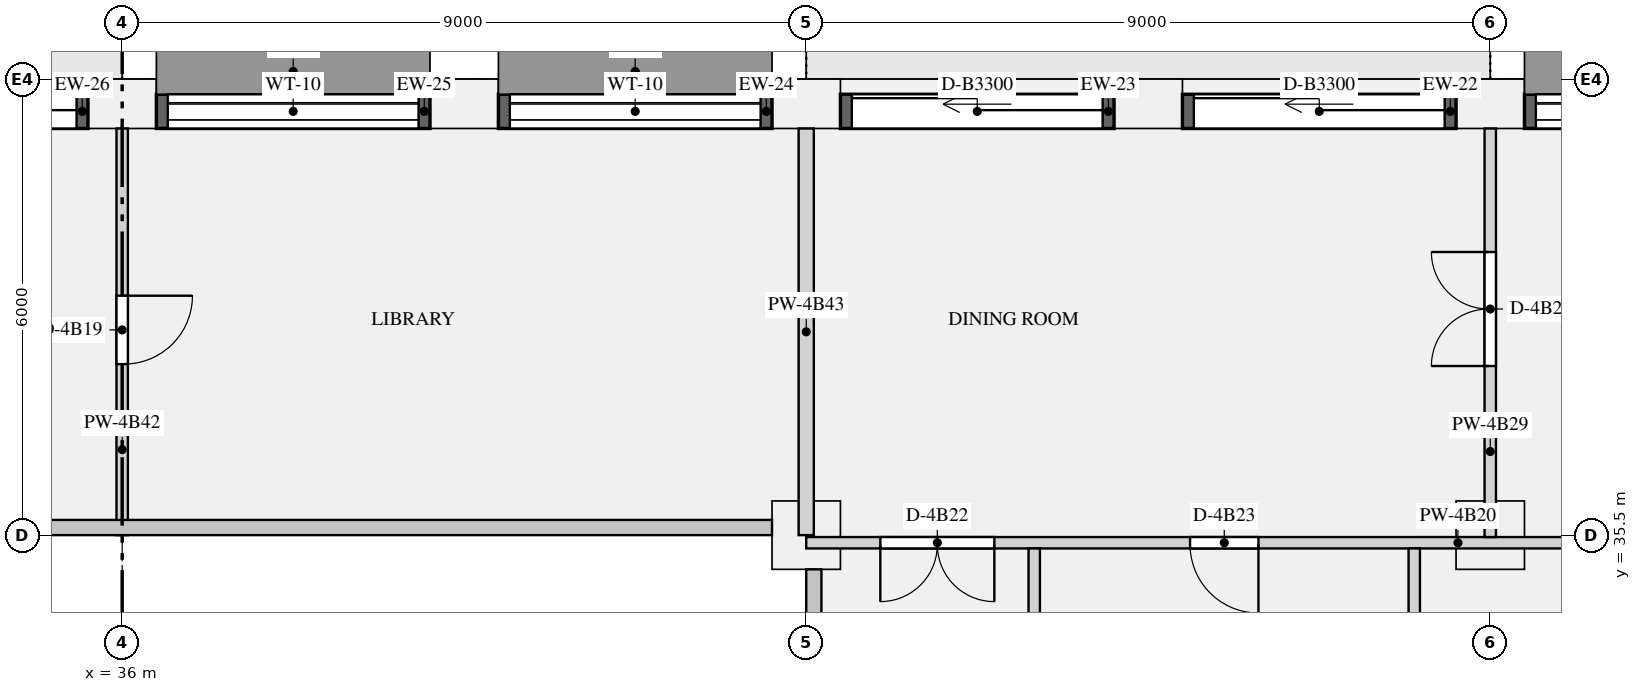
"""IFC4 building model, lengths in metres.
Left out: names, types, materials, properties, quantities, classifications, styles, units other than length and angle.
Written with IfcOpenShell. Run it as: python <this file> out.ifc"""

import sys

from ifc_helpers import new_model, si_unit, direction, frame, frame_2d, origin, origin_2d, place, context, subcontext, project, spatial, rectangle, extrude, element, fill, save


model = new_model("IFC4")
c1 = context("Model", 3, precision=1e-05, world=origin(), true_north=direction((0.0, 1.0)))
c2 = subcontext(c1, "Body", "Model", "MODEL_VIEW")
j1 = project(units=[si_unit("LENGTHUNIT", "METRE"), si_unit("PLANEANGLEUNIT", "RADIAN")], contexts=[c1])
p1 = place(None, origin())
s1 = spatial("IfcSite", under=j1, at=p1, CompositionType="ELEMENT")
p2 = place(p1, origin())
s2 = spatial("IfcBuilding", under=s1, at=p2, CompositionType="ELEMENT")
p3 = place(p2, frame((0.0, 0.0, 207.45)))
s3 = spatial("IfcBuildingStorey", under=s2, at=p3, CompositionType="ELEMENT", Elevation=207.45)
for number, where, z_axis, x_axis in (
    (1, (54.0, 41.175, 0.0), (0.0, 0.0, 1.0), (-1.0, 0.0, 0.0)),
    (2, (49.5, 41.175, 0.0), (0.0, 0.0, 1.0), (-1.0, 0.0, 0.0)),
    (3, (45.0, 41.175, 0.0), (0.0, 0.0, 1.0), (-1.0, 0.0, 0.0)),
    (4, (40.5, 41.175, 0.0), (0.0, 0.0, 1.0), (-1.0, 0.0, 0.0)),
    (5, (36.0, 41.175, 0.0), (0.0, 0.0, 1.0), (-1.0, 0.0, 0.0)),
):
    element("IfcColumn", number, at=place(p3, frame(where, z_axis=z_axis, x_axis=x_axis)), inside=s3, PredefinedType="USERDEFINED", context=c2, shape_type="SweptSolid", body=[
        extrude(rectangle(XDim=0.9, YDim=0.65, at=origin_2d()), origin(), (0.0, 0.0, 1.0), 3.15),
    ])
for number, where, z_axis, x_axis in (
    (6, (45.0, 35.5, 0.0), (0.0, 0.0, 1.0), (1.0, 0.0, 0.0)),
    (7, (54.0, 35.5, 0.0), (0.0, 0.0, 1.0), (1.0, 0.0, 0.0)),
):
    element("IfcColumn", number, at=place(p3, frame(where, z_axis=z_axis, x_axis=x_axis)), inside=s3, PredefinedType="COLUMN", context=c2, shape_type="SweptSolid", body=[
        extrude(rectangle(XDim=0.9, YDim=0.9, at=origin_2d()), origin(), (0.0, 0.0, 1.0), 3.15),
    ])
p4 = place(p3, frame((58.05, 41.075, 0.9), z_axis=(0.0, 0.0, 1.0), x_axis=(-1.0, 0.0, 0.0)))
e8 = element("IfcWall", 8, at=p4, inside=s3, PredefinedType="SOLIDWALL", context=c2, shape_type="SweptSolid", body=[
    extrude(rectangle(XDim=3.6, YDim=0.45, at=frame_2d((1.8, 0.0))), origin(), (0.0, 0.0, 1.0), 1.93),
])
p5 = place(p4, frame((0.15, 0.0, 0.15)))
e9 = element("IfcOpeningElement", 9, at=p5, cuts=e8, PredefinedType="OPENING", context=c2, shape_type="SweptSolid", body=[
    extrude(rectangle(XDim=3.3, YDim=1.5, at=frame_2d((1.65, 0.75))), frame((0.0, 0.235, 0.0), z_axis=(0.0, -1.0, 0.0), x_axis=(1.0, 0.0, 0.0)), (0.0, 0.0, 1.0), 0.47),
])
p6 = place(p3, frame((53.55, 41.075, 0.0), z_axis=(0.0, 0.0, 1.0), x_axis=(-1.0, 0.0, 0.0)))
e10 = element("IfcWall", 10, at=p6, inside=s3, PredefinedType="SOLIDWALL", context=c2, shape_type="SweptSolid", body=[
    extrude(rectangle(XDim=3.6, YDim=0.45, at=frame_2d((1.8, 0.0))), origin(), (0.0, 0.0, 1.0), 2.83),
])
p7 = place(p6, frame((0.15, 0.0, 0.0)))
e11 = element("IfcOpeningElement", 11, at=p7, cuts=e10, PredefinedType="OPENING", context=c2, shape_type="SweptSolid", body=[
    extrude(rectangle(XDim=3.3, YDim=2.3, at=frame_2d((1.65, 1.15))), frame((0.0, 0.235, 0.0), z_axis=(0.0, -1.0, 0.0), x_axis=(1.0, 0.0, 0.0)), (0.0, 0.0, 1.0), 0.47),
])
p8 = place(p3, frame((49.05, 41.075, 0.0), z_axis=(0.0, 0.0, 1.0), x_axis=(-1.0, 0.0, 0.0)))
e12 = element("IfcWall", 12, at=p8, inside=s3, PredefinedType="SOLIDWALL", context=c2, shape_type="SweptSolid", body=[
    extrude(rectangle(XDim=3.6, YDim=0.45, at=frame_2d((1.8, 0.0))), origin(), (0.0, 0.0, 1.0), 2.83),
])
p9 = place(p8, frame((0.15, 0.0, 0.0)))
e13 = element("IfcOpeningElement", 13, at=p9, cuts=e12, PredefinedType="OPENING", context=c2, shape_type="SweptSolid", body=[
    extrude(rectangle(XDim=3.3, YDim=2.3, at=frame_2d((1.65, 1.15))), frame((0.0, 0.235, 0.0), z_axis=(0.0, -1.0, 0.0), x_axis=(1.0, 0.0, 0.0)), (0.0, 0.0, 1.0), 0.47),
])
p10 = place(p3, frame((44.55, 41.075, 0.9), z_axis=(0.0, 0.0, 1.0), x_axis=(-1.0, 0.0, 0.0)))
e14 = element("IfcWall", 14, at=p10, inside=s3, PredefinedType="SOLIDWALL", context=c2, shape_type="SweptSolid", body=[
    extrude(rectangle(XDim=3.6, YDim=0.45, at=frame_2d((1.8, 0.0))), origin(), (0.0, 0.0, 1.0), 1.93),
])
p11 = place(p10, frame((0.15, 0.0, 0.15)))
e15 = element("IfcOpeningElement", 15, at=p11, cuts=e14, PredefinedType="OPENING", context=c2, shape_type="SweptSolid", body=[
    extrude(rectangle(XDim=3.3, YDim=1.5, at=frame_2d((1.65, 0.75))), frame((0.0, 0.235, 0.0), z_axis=(0.0, -1.0, 0.0), x_axis=(1.0, 0.0, 0.0)), (0.0, 0.0, 1.0), 0.47),
])
p12 = place(p3, frame((40.05, 41.075, 0.9), z_axis=(0.0, 0.0, 1.0), x_axis=(-1.0, 0.0, 0.0)))
e16 = element("IfcWall", 16, at=p12, inside=s3, PredefinedType="SOLIDWALL", context=c2, shape_type="SweptSolid", body=[
    extrude(rectangle(XDim=3.6, YDim=0.45, at=frame_2d((1.8, 0.0))), origin(), (0.0, 0.0, 1.0), 1.93),
])
p13 = place(p12, frame((0.15, 0.0, 0.15)))
e17 = element("IfcOpeningElement", 17, at=p13, cuts=e16, PredefinedType="OPENING", context=c2, shape_type="SweptSolid", body=[
    extrude(rectangle(XDim=3.3, YDim=1.5, at=frame_2d((1.65, 0.75))), frame((0.0, 0.235, 0.0), z_axis=(0.0, -1.0, 0.0), x_axis=(1.0, 0.0, 0.0)), (0.0, 0.0, 1.0), 0.47),
])
p14 = place(p3, frame((35.55, 41.075, 0.0), z_axis=(0.0, 0.0, 1.0), x_axis=(-1.0, 0.0, 0.0)))
e18 = element("IfcWall", 18, at=p14, inside=s3, PredefinedType="SOLIDWALL", context=c2, shape_type="SweptSolid", body=[
    extrude(rectangle(XDim=3.6, YDim=0.45, at=frame_2d((1.8, 0.0))), origin(), (0.0, 0.0, 1.0), 2.83),
])
p15 = place(p14, frame((0.15, 0.0, 0.0)))
e19 = element("IfcOpeningElement", 19, at=p15, cuts=e18, PredefinedType="OPENING", context=c2, shape_type="SweptSolid", body=[
    extrude(rectangle(XDim=3.3, YDim=2.3, at=frame_2d((1.65, 1.15))), frame((0.0, 0.235, 0.0), z_axis=(0.0, -1.0, 0.0), x_axis=(1.0, 0.0, 0.0)), (0.0, 0.0, 1.0), 0.47),
])
p16 = place(p3, frame((45.0, 35.4, 0.0), z_axis=(0.0, 0.0, 1.0), x_axis=(1.0, 0.0, 0.0)))
e20 = element("IfcWall", 20, at=p16, inside=s3, PredefinedType="PARTITIONING", context=c2, shape_type="SweptSolid", body=[
    extrude(rectangle(XDim=11.2, YDim=0.15, at=frame_2d((5.6, 0.0))), origin(), (0.0, 0.0, 1.0), 2.83),
])
p17 = place(p16, frame((0.975, 0.0, 0.0)))
e21 = element("IfcOpeningElement", 21, at=p17, cuts=e20, PredefinedType="OPENING", context=c2, shape_type="SweptSolid", body=[
    extrude(rectangle(XDim=1.5, YDim=2.1, at=frame_2d((0.75, 1.05))), frame((0.0, 0.085, 0.0), z_axis=(0.0, -1.0, 0.0), x_axis=(1.0, 0.0, 0.0)), (0.0, 0.0, 1.0), 0.17),
])
p18 = place(p16, frame((5.05, 0.0, 0.0)))
e22 = element("IfcOpeningElement", 22, at=p18, cuts=e20, PredefinedType="OPENING", context=c2, shape_type="SweptSolid", body=[
    extrude(rectangle(XDim=0.9, YDim=2.1, at=frame_2d((0.45, 1.05))), frame((0.0, 0.085, 0.0), z_axis=(0.0, -1.0, 0.0), x_axis=(1.0, 0.0, 0.0)), (0.0, 0.0, 1.0), 0.17),
])
p19 = place(p3, frame((54.0, 35.475, 0.0), z_axis=(0.0, 0.0, 1.0), x_axis=(0.0, 1.0, 0.0)))
e23 = element("IfcWall", 23, at=p19, inside=s3, PredefinedType="PARTITIONING", context=c2, shape_type="SweptSolid", body=[
    extrude(rectangle(XDim=5.375, YDim=0.15, at=frame_2d((2.688, 0.0))), origin(), (0.0, 0.0, 1.0), 2.83),
])
p20 = place(p19, frame((2.25, 0.0, 0.0)))
e24 = element("IfcOpeningElement", 24, at=p20, cuts=e23, PredefinedType="OPENING", context=c2, shape_type="SweptSolid", body=[
    extrude(rectangle(XDim=1.5, YDim=2.1, at=frame_2d((0.75, 1.05))), frame((0.0, 0.085, 0.0), z_axis=(0.0, -1.0, 0.0), x_axis=(1.0, 0.0, 0.0)), (0.0, 0.0, 1.0), 0.17),
])
p21 = place(p3, frame((48.0, 27.1, 0.0), z_axis=(0.0, 0.0, 1.0), x_axis=(0.0, 1.0, 0.0)))
e25 = element("IfcWall", 25, at=p21, inside=s3, PredefinedType="PARTITIONING", context=c2, shape_type="SweptSolid", body=[
    extrude(rectangle(XDim=8.225, YDim=0.15, at=frame_2d((4.112, 0.0))), origin(), (0.0, 0.0, 1.0), 2.83),
])
p22 = place(p21, frame((3.65, 0.0, 0.0)))
e26 = element("IfcOpeningElement", 26, at=p22, cuts=e25, PredefinedType="OPENING", context=c2, shape_type="SweptSolid", body=[
    extrude(rectangle(XDim=0.9, YDim=2.1, at=frame_2d((0.45, 1.05))), frame((0.0, 0.085, 0.0), z_axis=(0.0, -1.0, 0.0), x_axis=(1.0, 0.0, 0.0)), (0.0, 0.0, 1.0), 0.17),
])
p23 = place(p3, frame((36.0, 35.5, 0.0), z_axis=(0.0, 0.0, 1.0), x_axis=(0.0, 1.0, 0.0)))
e27 = element("IfcWall", 27, at=p23, inside=s3, PredefinedType="PARTITIONING", context=c2, shape_type="SweptSolid", body=[
    extrude(rectangle(XDim=5.35, YDim=0.15, at=frame_2d((2.675, 0.0))), origin(), (0.0, 0.0, 1.0), 2.83),
])
p24 = place(p23, frame((2.25, 0.0, 0.0)))
e28 = element("IfcOpeningElement", 28, at=p24, cuts=e27, PredefinedType="OPENING", context=c2, shape_type="SweptSolid", body=[
    extrude(rectangle(XDim=0.9, YDim=2.1, at=frame_2d((0.45, 1.05))), frame((0.0, 0.085, 0.0), z_axis=(0.0, -1.0, 0.0), x_axis=(1.0, 0.0, 0.0)), (0.0, 0.0, 1.0), 0.17),
])
p25 = place(p3, frame((45.0, 35.5, 0.0), z_axis=(0.0, 0.0, 1.0), x_axis=(0.0, 1.0, 0.0)))
e29 = element("IfcWall", 29, at=p25, inside=s3, PredefinedType="PARTITIONING", context=c2, shape_type="SweptSolid", body=[
    extrude(rectangle(XDim=5.35, YDim=0.2, at=frame_2d((2.675, 0.0))), origin(), (0.0, 0.0, 1.0), 2.83),
])
p26 = place(p3, frame((53.0, 27.1, 0.0), z_axis=(0.0, 0.0, 1.0), x_axis=(0.0, 1.0, 0.0)))
e30 = element("IfcWall", 30, at=p26, inside=s3, PredefinedType="PARTITIONING", context=c2, shape_type="SweptSolid", body=[
    extrude(rectangle(XDim=8.225, YDim=0.15, at=frame_2d((4.112, 0.0))), origin(), (0.0, 0.0, 1.0), 2.83),
])
p27 = place(p26, frame((1.45, 0.0, 0.0)))
e31 = element("IfcOpeningElement", 31, at=p27, cuts=e30, PredefinedType="OPENING", context=c2, shape_type="SweptSolid", body=[
    extrude(rectangle(XDim=0.9, YDim=2.1, at=frame_2d((0.45, 1.05))), frame((0.0, 0.085, 0.0), z_axis=(0.0, -1.0, 0.0), x_axis=(1.0, 0.0, 0.0)), (0.0, 0.0, 1.0), 0.17),
])
p28 = place(p26, frame((5.625, 0.0, 0.0)))
e32 = element("IfcOpeningElement", 32, at=p28, cuts=e30, PredefinedType="OPENING", context=c2, shape_type="SweptSolid", body=[
    extrude(rectangle(XDim=0.9, YDim=2.1, at=frame_2d((0.45, 1.05))), frame((0.0, 0.085, 0.0), z_axis=(0.0, -1.0, 0.0), x_axis=(1.0, 0.0, 0.0)), (0.0, 0.0, 1.0), 0.17),
])
p29 = place(p5, origin())
e33 = element("IfcWindow", 33, at=p29, inside=s3, PartitioningType="SINGLE_PANEL", PredefinedType="WINDOW", context=c2, shape_type="SweptSolid", body=[
    extrude(rectangle(XDim=3.3, YDim=1.5, at=frame_2d((1.65, 0.75))), frame((0.0, -0.065, 0.0), z_axis=(0.0, -1.0, 0.0), x_axis=(1.0, 0.0, 0.0)), (0.0, 0.0, 1.0), 0.06),
])
fill(e9, e33)
p30 = place(p7, origin())
e34 = element("IfcDoor", 34, at=p30, inside=s3, OperationType="SLIDING_TO_LEFT", PredefinedType="DOOR", context=c2, shape_type="SweptSolid", body=[
    extrude(rectangle(XDim=3.3, YDim=2.3, at=frame_2d((1.65, 1.15))), frame((0.0, -0.07, 0.0), z_axis=(0.0, -1.0, 0.0), x_axis=(1.0, 0.0, 0.0)), (0.0, 0.0, 1.0), 0.05),
])
fill(e11, e34)
p31 = place(p9, origin())
e35 = element("IfcDoor", 35, at=p31, inside=s3, OperationType="SLIDING_TO_LEFT", PredefinedType="DOOR", context=c2, shape_type="SweptSolid", body=[
    extrude(rectangle(XDim=3.3, YDim=2.3, at=frame_2d((1.65, 1.15))), frame((0.0, -0.07, 0.0), z_axis=(0.0, -1.0, 0.0), x_axis=(1.0, 0.0, 0.0)), (0.0, 0.0, 1.0), 0.05),
])
fill(e13, e35)
p32 = place(p11, origin())
e36 = element("IfcWindow", 36, at=p32, inside=s3, PartitioningType="SINGLE_PANEL", PredefinedType="WINDOW", context=c2, shape_type="SweptSolid", body=[
    extrude(rectangle(XDim=3.3, YDim=1.5, at=frame_2d((1.65, 0.75))), frame((0.0, -0.065, 0.0), z_axis=(0.0, -1.0, 0.0), x_axis=(1.0, 0.0, 0.0)), (0.0, 0.0, 1.0), 0.06),
])
fill(e15, e36)
p33 = place(p13, origin())
e37 = element("IfcWindow", 37, at=p33, inside=s3, PartitioningType="SINGLE_PANEL", PredefinedType="WINDOW", context=c2, shape_type="SweptSolid", body=[
    extrude(rectangle(XDim=3.3, YDim=1.5, at=frame_2d((1.65, 0.75))), frame((0.0, -0.065, 0.0), z_axis=(0.0, -1.0, 0.0), x_axis=(1.0, 0.0, 0.0)), (0.0, 0.0, 1.0), 0.06),
])
fill(e17, e37)
p34 = place(p15, origin())
e38 = element("IfcDoor", 38, at=p34, inside=s3, OperationType="SLIDING_TO_LEFT", PredefinedType="DOOR", context=c2, shape_type="SweptSolid", body=[
    extrude(rectangle(XDim=3.3, YDim=2.3, at=frame_2d((1.65, 1.15))), frame((0.0, -0.07, 0.0), z_axis=(0.0, -1.0, 0.0), x_axis=(1.0, 0.0, 0.0)), (0.0, 0.0, 1.0), 0.05),
])
fill(e19, e38)
p35 = place(p24, frame((0.9, 0.0, 0.0), z_axis=(0.0, 0.0, 1.0), x_axis=(-1.0, 0.0, 0.0)))
e39 = element("IfcDoor", 39, at=p35, inside=s3, OperationType="SINGLE_SWING_LEFT", PredefinedType="DOOR", context=c2, shape_type="SweptSolid", body=[
    extrude(rectangle(XDim=0.9, YDim=2.1, at=frame_2d((0.45, 1.05))), frame((0.0, 0.025, 0.0), z_axis=(0.0, -1.0, 0.0), x_axis=(1.0, 0.0, 0.0)), (0.0, 0.0, 1.0), 0.05),
])
fill(e28, e39)
p36 = place(p17, frame((1.5, 0.0, 0.0), z_axis=(0.0, 0.0, 1.0), x_axis=(-1.0, 0.0, 0.0)))
e40 = element("IfcDoor", 40, at=p36, inside=s3, OperationType="DOUBLE_DOOR_SINGLE_SWING", PredefinedType="DOOR", context=c2, shape_type="SweptSolid", body=[
    extrude(rectangle(XDim=1.5, YDim=2.1, at=frame_2d((0.75, 1.05))), frame((0.0, 0.025, 0.0), z_axis=(0.0, -1.0, 0.0), x_axis=(1.0, 0.0, 0.0)), (0.0, 0.0, 1.0), 0.05),
])
fill(e21, e40)
p37 = place(p18, frame((0.9, 0.0, 0.0), z_axis=(0.0, 0.0, 1.0), x_axis=(-1.0, 0.0, 0.0)))
e41 = element("IfcDoor", 41, at=p37, inside=s3, OperationType="SINGLE_SWING_LEFT", PredefinedType="DOOR", context=c2, shape_type="SweptSolid", body=[
    extrude(rectangle(XDim=0.9, YDim=2.1, at=frame_2d((0.45, 1.05))), frame((0.0, 0.025, 0.0), z_axis=(0.0, -1.0, 0.0), x_axis=(1.0, 0.0, 0.0)), (0.0, 0.0, 1.0), 0.05),
])
fill(e22, e41)
p38 = place(p20, origin())
e42 = element("IfcDoor", 42, at=p38, inside=s3, OperationType="DOUBLE_DOOR_SINGLE_SWING", PredefinedType="DOOR", context=c2, shape_type="SweptSolid", body=[
    extrude(rectangle(XDim=1.5, YDim=2.1, at=frame_2d((0.75, 1.05))), frame((0.0, 0.025, 0.0), z_axis=(0.0, -1.0, 0.0), x_axis=(1.0, 0.0, 0.0)), (0.0, 0.0, 1.0), 0.05),
])
fill(e24, e42)
save(model, sys.argv[1])
